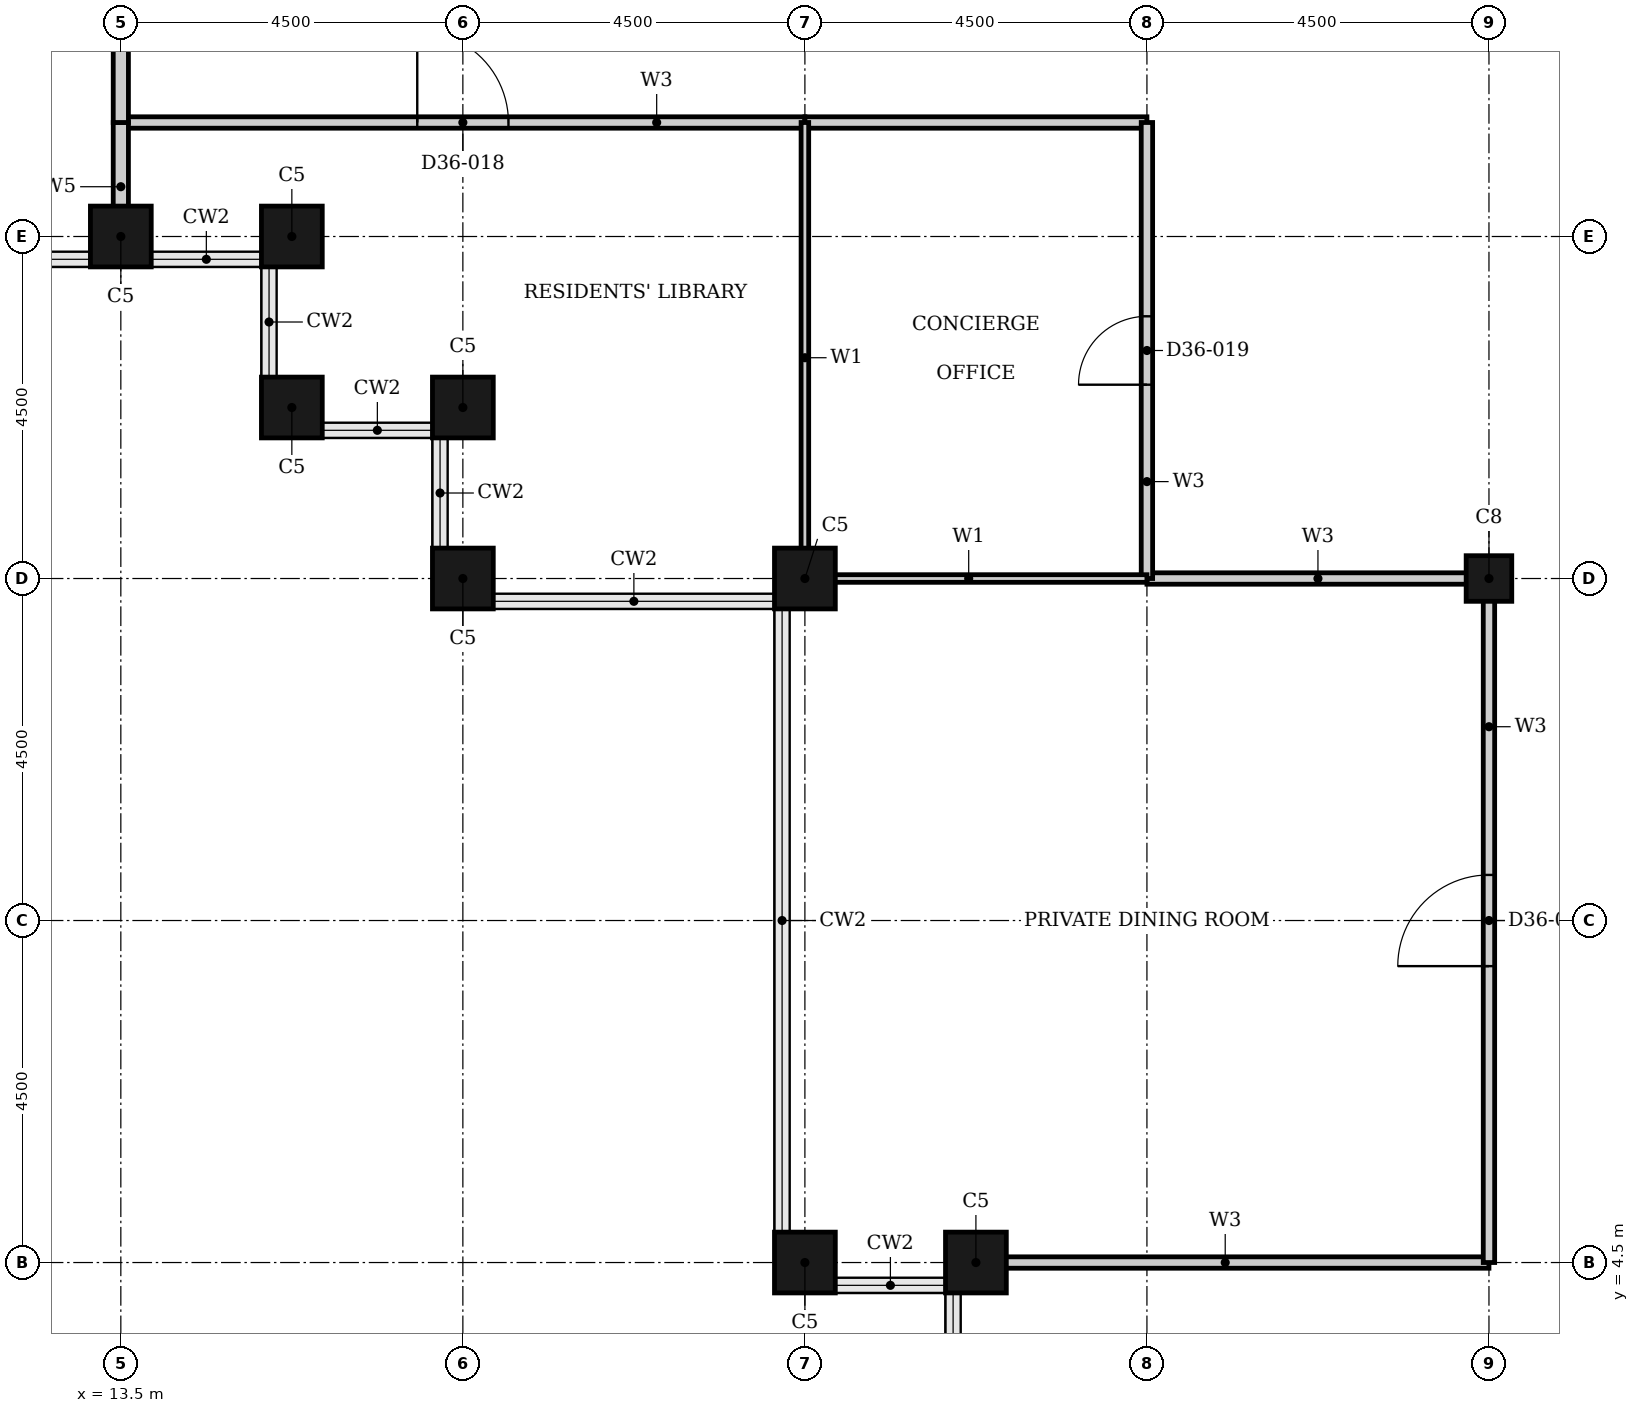
"""IFC4 building model, lengths in metres.
Left out: names, types, materials, properties, quantities, classifications, styles, units other than length and angle.
Written with IfcOpenShell. Run it as: python <this file> out.ifc"""

import sys

from ifc_helpers import new_model, si_unit, direction, frame, frame_2d, origin, origin_2d, place, context, subcontext, project, spatial, rectangle, hollow_rectangle, extrude, element, fill, save


model = new_model("IFC4")
c1 = context("Model", 3, precision=1e-05, world=origin(), true_north=direction((0.0, 1.0)))
c2 = subcontext(c1, "Body", "Model", "MODEL_VIEW")
j1 = project(units=[si_unit("LENGTHUNIT", "METRE"), si_unit("PLANEANGLEUNIT", "RADIAN")], contexts=[c1])
p1 = place(None, origin())
s1 = spatial("IfcSite", under=j1, at=p1, CompositionType="ELEMENT")
p2 = place(p1, origin())
s2 = spatial("IfcBuilding", under=s1, at=p2, CompositionType="ELEMENT")
p3 = place(p2, frame((0.0, 0.0, 145.2)))
s3 = spatial("IfcBuildingStorey", under=s2, at=p3, CompositionType="ELEMENT", Elevation=145.2)
for number, where, z_axis, x_axis in (
    (1, (22.5, 4.5, 0.0), (0.0, 0.0, 1.0), (1.0, 0.0, 0.0)),
    (2, (24.75, 4.5, 0.0), (0.0, 0.0, 1.0), (1.0, 0.0, 0.0)),
    (3, (13.5, 18.0, 0.0), (0.0, 0.0, 1.0), (1.0, 0.0, 0.0)),
    (4, (15.75, 18.0, 0.0), (0.0, 0.0, 1.0), (1.0, 0.0, 0.0)),
    (5, (15.75, 15.75, 0.0), (0.0, 0.0, 1.0), (1.0, 0.0, 0.0)),
    (6, (18.0, 15.75, 0.0), (0.0, 0.0, 1.0), (1.0, 0.0, 0.0)),
    (7, (18.0, 13.5, 0.0), (0.0, 0.0, 1.0), (1.0, 0.0, 0.0)),
    (8, (22.5, 13.5, 0.0), (0.0, 0.0, 1.0), (1.0, 0.0, 0.0)),
):
    element("IfcColumn", number, at=place(p3, frame(where, z_axis=z_axis, x_axis=x_axis)), inside=s3, PredefinedType="COLUMN", context=c2, shape_type="SweptSolid", body=[
        extrude(hollow_rectangle(XDim=0.8, YDim=0.8, WallThickness=0.025, at=origin_2d()), origin(), (0.0, 0.0, 1.0), 5.4),
    ])
p4 = place(p3, frame((31.5, 13.5, 0.0), z_axis=(0.0, 0.0, 1.0), x_axis=(1.0, 0.0, 0.0)))
e9 = element("IfcColumn", 9, at=p4, inside=s3, PredefinedType="COLUMN", context=c2, shape_type="SweptSolid", body=[
    extrude(hollow_rectangle(XDim=0.6, YDim=0.6, WallThickness=0.02, at=origin_2d()), origin(), (0.0, 0.0, 1.0), 5.4),
])
p5 = place(p3, frame((27.0, 13.5, 0.0), z_axis=(0.0, 0.0, 1.0), x_axis=(1.0, 0.0, 0.0)))
e10 = element("IfcWall", 10, at=p5, inside=s3, PredefinedType="PARTITIONING", context=c2, shape_type="SweptSolid", body=[
    extrude(rectangle(XDim=4.5, YDim=0.15, at=frame_2d((2.25, 0.0))), origin(), (0.0, 0.0, 1.0), 4.18),
])
p6 = place(p3, frame((13.5, 19.5, 0.0), z_axis=(0.0, 0.0, 1.0), x_axis=(1.0, 0.0, 0.0)))
e11 = element("IfcWall", 11, at=p6, inside=s3, PredefinedType="PARTITIONING", context=c2, shape_type="SweptSolid", body=[
    extrude(rectangle(XDim=9.0, YDim=0.15, at=frame_2d((4.5, 0.0))), origin(), (0.0, 0.0, 1.0), 5.1),
])
p7 = place(p6, frame((3.9, 0.0, 0.0)))
e12 = element("IfcOpeningElement", 12, at=p7, cuts=e11, PredefinedType="OPENING", context=c2, shape_type="SweptSolid", body=[
    extrude(rectangle(XDim=1.2, YDim=2.4, at=frame_2d((0.6, 1.2))), frame((0.0, 0.085, 0.0), z_axis=(0.0, -1.0, 0.0), x_axis=(1.0, 0.0, 0.0)), (0.0, 0.0, 1.0), 0.17),
])
p8 = place(p3, frame((22.5, 19.5, 0.0), z_axis=(0.0, 0.0, 1.0), x_axis=(1.0, 0.0, 0.0)))
e13 = element("IfcWall", 13, at=p8, inside=s3, PredefinedType="PARTITIONING", context=c2, shape_type="SweptSolid", body=[
    extrude(rectangle(XDim=4.5, YDim=0.15, at=frame_2d((2.25, 0.0))), origin(), (0.0, 0.0, 1.0), 5.1),
])
p9 = place(p3, frame((24.56, 4.5, 0.0), z_axis=(0.0, 0.0, 1.0), x_axis=(1.0, 0.0, 0.0)))
e14 = element("IfcWall", 14, at=p9, inside=s3, PredefinedType="PARTITIONING", context=c2, shape_type="SweptSolid", body=[
    extrude(rectangle(XDim=6.94, YDim=0.15, at=frame_2d((3.47, 0.0))), origin(), (0.0, 0.0, 1.0), 5.1),
])
p10 = place(p3, frame((27.0, 13.5, 0.0), z_axis=(0.0, 0.0, 1.0), x_axis=(0.0, 1.0, 0.0)))
e15 = element("IfcWall", 15, at=p10, inside=s3, PredefinedType="PARTITIONING", context=c2, shape_type="SweptSolid", body=[
    extrude(rectangle(XDim=6.0, YDim=0.15, at=frame_2d((3.0, 0.0))), origin(), (0.0, 0.0, 1.0), 5.1),
])
p11 = place(p10, frame((2.55, 0.0, 0.0)))
e16 = element("IfcOpeningElement", 16, at=p11, cuts=e15, PredefinedType="OPENING", context=c2, shape_type="SweptSolid", body=[
    extrude(rectangle(XDim=0.9, YDim=2.1, at=frame_2d((0.45, 1.05))), frame((0.0, 0.085, 0.0), z_axis=(0.0, -1.0, 0.0), x_axis=(1.0, 0.0, 0.0)), (0.0, 0.0, 1.0), 0.17),
])
p12 = place(p3, frame((31.5, 4.5, 0.0), z_axis=(0.0, 0.0, 1.0), x_axis=(0.0, 1.0, 0.0)))
e17 = element("IfcWall", 17, at=p12, inside=s3, PredefinedType="PARTITIONING", context=c2, shape_type="SweptSolid", body=[
    extrude(rectangle(XDim=9.0, YDim=0.15, at=frame_2d((4.5, 0.0))), origin(), (0.0, 0.0, 1.0), 4.38),
])
p13 = place(p12, frame((3.9, 0.0, 0.0)))
e18 = element("IfcOpeningElement", 18, at=p13, cuts=e17, PredefinedType="OPENING", context=c2, shape_type="SweptSolid", body=[
    extrude(rectangle(XDim=1.2, YDim=2.4, at=frame_2d((0.6, 1.2))), frame((0.0, 0.085, 0.0), z_axis=(0.0, -1.0, 0.0), x_axis=(1.0, 0.0, 0.0)), (0.0, 0.0, 1.0), 0.17),
])
p14 = place(p3, frame((22.31, 13.5, 0.0), z_axis=(0.0, 0.0, 1.0), x_axis=(1.0, 0.0, 0.0)))
e19 = element("IfcWall", 19, at=p14, inside=s3, PredefinedType="PARTITIONING", context=c2, shape_type="SweptSolid", body=[
    extrude(rectangle(XDim=4.69, YDim=0.1, at=frame_2d((2.345, 0.0))), origin(), (0.0, 0.0, 1.0), 4.18),
])
p15 = place(p3, frame((22.5, 13.31, 0.0), z_axis=(0.0, 0.0, 1.0), x_axis=(0.0, 1.0, 0.0)))
e20 = element("IfcWall", 20, at=p15, inside=s3, PredefinedType="PARTITIONING", context=c2, shape_type="SweptSolid", body=[
    extrude(rectangle(XDim=6.19, YDim=0.1, at=frame_2d((3.095, 0.0))), origin(), (0.0, 0.0, 1.0), 5.1),
])
p16 = place(p3, frame((13.5, 17.81, 0.0), z_axis=(0.0, 0.0, 1.0), x_axis=(0.0, 1.0, 0.0)))
e21 = element("IfcWall", 21, at=p16, inside=s3, PredefinedType="PARTITIONING", context=c2, shape_type="SweptSolid", body=[
    extrude(rectangle(XDim=1.69, YDim=0.2, at=frame_2d((0.845, 0.0))), origin(), (0.0, 0.0, 1.0), 4.18),
])
p17 = place(p3, frame((13.5, 19.5, 0.0), z_axis=(0.0, 0.0, 1.0), x_axis=(0.0, 1.0, 0.0)))
e22 = element("IfcWall", 22, at=p17, inside=s3, PredefinedType="PARTITIONING", context=c2, shape_type="SweptSolid", body=[
    extrude(rectangle(XDim=15.0, YDim=0.2, at=frame_2d((7.5, 0.0))), origin(), (0.0, 0.0, 1.0), 4.18),
])
p18 = place(p17, frame((5.55, 0.0, 0.0)))
e23 = element("IfcOpeningElement", 23, at=p18, cuts=e22, PredefinedType="OPENING", context=c2, shape_type="SweptSolid", body=[
    extrude(rectangle(XDim=1.2, YDim=2.1, at=frame_2d((0.6, 1.05))), frame((0.0, 0.11, 0.0), z_axis=(0.0, -1.0, 0.0), x_axis=(1.0, 0.0, 0.0)), (0.0, 0.0, 1.0), 0.22),
])
p19 = place(p7, origin())
e24 = element("IfcDoor", 24, at=p19, inside=s3, OperationType="SINGLE_SWING_LEFT", PredefinedType="DOOR", context=c2, shape_type="SweptSolid", body=[
    extrude(rectangle(XDim=1.2, YDim=2.4, at=frame_2d((0.6, 1.2))), frame((0.0, 0.025, 0.0), z_axis=(0.0, -1.0, 0.0), x_axis=(1.0, 0.0, 0.0)), (0.0, 0.0, 1.0), 0.05),
])
fill(e12, e24)
p20 = place(p11, origin())
e25 = element("IfcDoor", 25, at=p20, inside=s3, OperationType="SINGLE_SWING_LEFT", PredefinedType="DOOR", context=c2, shape_type="SweptSolid", body=[
    extrude(rectangle(XDim=0.9, YDim=2.1, at=frame_2d((0.45, 1.05))), frame((0.0, 0.025, 0.0), z_axis=(0.0, -1.0, 0.0), x_axis=(1.0, 0.0, 0.0)), (0.0, 0.0, 1.0), 0.05),
])
fill(e16, e25)
p21 = place(p13, origin())
e26 = element("IfcDoor", 26, at=p21, inside=s3, OperationType="SINGLE_SWING_LEFT", PredefinedType="DOOR", context=c2, shape_type="SweptSolid", body=[
    extrude(rectangle(XDim=1.2, YDim=2.4, at=frame_2d((0.6, 1.2))), frame((0.0, 0.025, 0.0), z_axis=(0.0, -1.0, 0.0), x_axis=(1.0, 0.0, 0.0)), (0.0, 0.0, 1.0), 0.05),
])
fill(e18, e26)
save(model, sys.argv[1])
